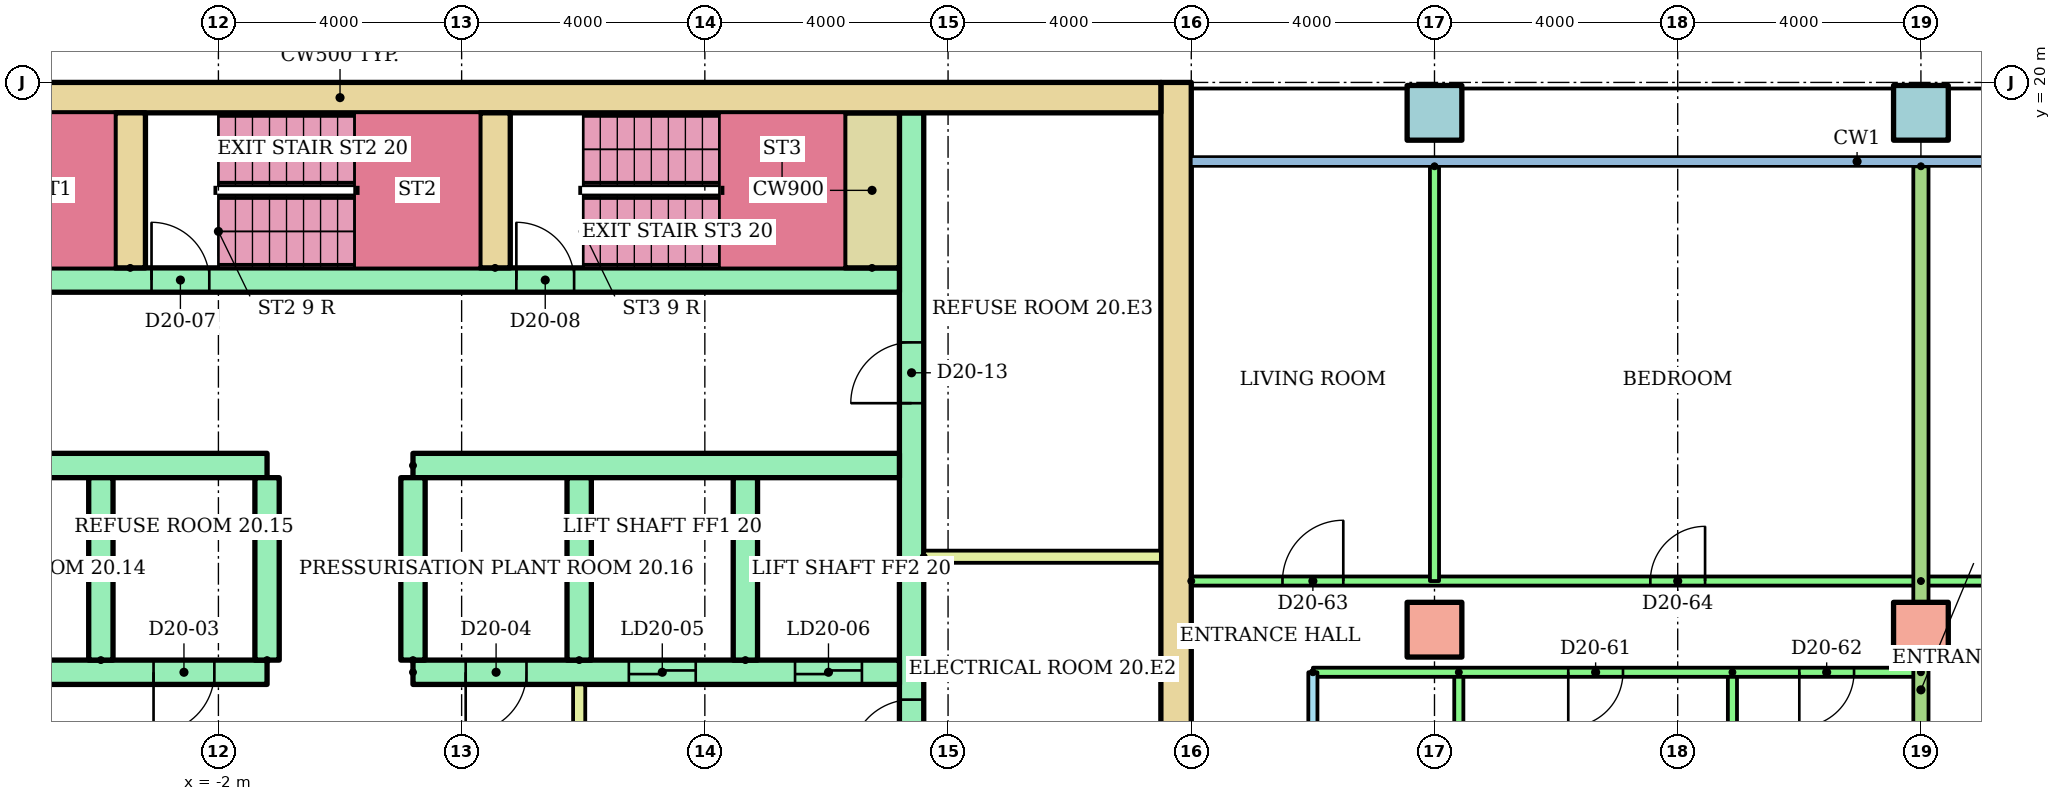
"""IFC4 building model, lengths in metres.
Left out: names, types, materials, properties, quantities, classifications, styles, units other than length and angle.
Written with IfcOpenShell. Run it as: python <this file> out.ifc"""

import sys

from ifc_helpers import new_model, si_unit, direction, frame, frame_2d, origin, origin_2d, place, context, subcontext, project, spatial, rectangle, hollow_rectangle, extrude, element, fill, save


model = new_model("IFC4")
c1 = context("Model", 3, precision=1e-05, world=origin(), true_north=direction((0.0, 1.0)))
c2 = subcontext(c1, "Body", "Model", "MODEL_VIEW")
j1 = project(units=[si_unit("LENGTHUNIT", "METRE"), si_unit("PLANEANGLEUNIT", "RADIAN")], contexts=[c1])
p1 = place(None, origin())
s1 = spatial("IfcSite", under=j1, at=p1, CompositionType="ELEMENT")
p2 = place(p1, origin())
s2 = spatial("IfcBuilding", under=s1, at=p2, CompositionType="ELEMENT")
p3 = place(p2, frame((0.0, 0.0, 80.7)))
s3 = spatial("IfcBuildingStorey", under=s2, at=p3, CompositionType="ELEMENT", Elevation=80.7)
for number, where in (
    (1, (18.0, 11.0, 0.0)),
    (2, (26.0, 11.0, 0.0)),
):
    element("IfcColumn", number, at=place(p3, frame(where)), inside=s3, PredefinedType="COLUMN", context=c2, shape_type="SweptSolid", body=[
        extrude(rectangle(XDim=0.9, YDim=0.9, at=origin_2d()), origin(), (0.0, 0.0, 1.0), 3.2),
    ])
for number, where in (
    (3, (18.0, 19.5, 0.0)),
    (4, (26.0, 19.5, 0.0)),
):
    element("IfcColumn", number, at=place(p3, frame(where)), inside=s3, PredefinedType="COLUMN", context=c2, shape_type="SweptSolid", body=[
        extrude(hollow_rectangle(XDim=0.9, YDim=0.9, WallThickness=0.045, at=origin_2d()), origin(), (0.0, 0.0, 1.0), 3.2),
    ])
p4 = place(p3, frame((13.75, 3.0, 0.0), z_axis=(0.0, 0.0, 1.0), x_axis=(0.0, 1.0, 0.0)))
e5 = element("IfcWall", 5, at=p4, inside=s3, PredefinedType="SHEAR", context=c2, shape_type="SweptSolid", body=[
    extrude(rectangle(XDim=17.0, YDim=0.5, at=frame_2d((8.5, 0.0))), origin(), (0.0, 0.0, 1.0), 2.92),
])
p5 = place(p3, frame((-13.5, 19.75, 0.0)))
e6 = element("IfcWall", 6, at=p5, inside=s3, PredefinedType="SHEAR", context=c2, shape_type="SweptSolid", body=[
    extrude(rectangle(XDim=27.0, YDim=0.5, at=frame_2d((13.5, 0.0))), origin(), (0.0, 0.0, 1.0), 2.92),
])
p6 = place(p3, frame((9.4, 6.8, 0.0), z_axis=(0.0, 0.0, 1.0), x_axis=(0.0, 1.0, 0.0)))
e7 = element("IfcWall", 7, at=p6, inside=s3, PredefinedType="SHEAR", context=c2, shape_type="SweptSolid", body=[
    extrude(rectangle(XDim=12.7, YDim=0.4, at=frame_2d((6.35, 0.0))), origin(), (0.0, 0.0, 1.0), 2.92),
])
p7 = place(p6, frame((0.3, 0.0, 0.0)))
e8 = element("IfcOpeningElement", 8, at=p7, cuts=e7, PredefinedType="OPENING", context=c2, shape_type="SweptSolid", body=[
    extrude(rectangle(XDim=1.0, YDim=2.1, at=frame_2d((0.5, 1.05))), frame((0.0, 0.21, 0.0), z_axis=(0.0, -1.0, 0.0), x_axis=(1.0, 0.0, 0.0)), (0.0, 0.0, 1.0), 0.42),
])
p8 = place(p6, frame((2.05, 0.0, 0.0)))
e9 = element("IfcOpeningElement", 9, at=p8, cuts=e7, PredefinedType="OPENING", context=c2, shape_type="SweptSolid", body=[
    extrude(rectangle(XDim=1.0, YDim=2.1, at=frame_2d((0.5, 1.05))), frame((0.0, 0.21, 0.0), z_axis=(0.0, -1.0, 0.0), x_axis=(1.0, 0.0, 0.0)), (0.0, 0.0, 1.0), 0.42),
])
p9 = place(p6, frame((7.925, 0.0, 0.0)))
e10 = element("IfcOpeningElement", 10, at=p9, cuts=e7, PredefinedType="OPENING", context=c2, shape_type="SweptSolid", body=[
    extrude(rectangle(XDim=1.0, YDim=2.1, at=frame_2d((0.5, 1.05))), frame((0.0, 0.21, 0.0), z_axis=(0.0, -1.0, 0.0), x_axis=(1.0, 0.0, 0.0)), (0.0, 0.0, 1.0), 0.42),
])
p10 = place(p3, frame((-9.2, 10.3, 0.0)))
e11 = element("IfcWall", 11, at=p10, inside=s3, PredefinedType="SHEAR", context=c2, shape_type="SweptSolid", body=[
    extrude(rectangle(XDim=8.0, YDim=0.4, at=frame_2d((4.0, 0.0))), origin(), (0.0, 0.0, 1.0), 2.92),
])
p11 = place(p10, frame((2.033, 0.0, 0.0)))
e12 = element("IfcOpeningElement", 12, at=p11, cuts=e11, PredefinedType="OPENING", context=c2, shape_type="SweptSolid", body=[
    extrude(rectangle(XDim=1.0, YDim=2.1, at=frame_2d((0.5, 1.05))), frame((0.0, 0.21, 0.0), z_axis=(0.0, -1.0, 0.0), x_axis=(1.0, 0.0, 0.0)), (0.0, 0.0, 1.0), 0.42),
])
p12 = place(p10, frame((6.133, 0.0, 0.0)))
e13 = element("IfcOpeningElement", 13, at=p12, cuts=e11, PredefinedType="OPENING", context=c2, shape_type="SweptSolid", body=[
    extrude(rectangle(XDim=1.0, YDim=2.1, at=frame_2d((0.5, 1.05))), frame((0.0, 0.21, 0.0), z_axis=(0.0, -1.0, 0.0), x_axis=(1.0, 0.0, 0.0)), (0.0, 0.0, 1.0), 0.42),
])
p13 = place(p3, frame((-9.2, 13.7, 0.0)))
e14 = element("IfcWall", 14, at=p13, inside=s3, PredefinedType="SHEAR", context=c2, shape_type="SweptSolid", body=[
    extrude(rectangle(XDim=8.0, YDim=0.4, at=frame_2d((4.0, 0.0))), origin(), (0.0, 0.0, 1.0), 2.92),
])
p14 = place(p3, frame((1.2, 10.3, 0.0)))
e15 = element("IfcWall", 15, at=p14, inside=s3, PredefinedType="SHEAR", context=c2, shape_type="SweptSolid", body=[
    extrude(rectangle(XDim=8.0, YDim=0.4, at=frame_2d((4.0, 0.0))), origin(), (0.0, 0.0, 1.0), 2.92),
])
p15 = place(p14, frame((3.55, 0.0, 0.0)))
e16 = element("IfcOpeningElement", 16, at=p15, cuts=e15, PredefinedType="OPENING", context=c2, shape_type="SweptSolid", body=[
    extrude(rectangle(XDim=1.1, YDim=2.1, at=frame_2d((0.55, 1.05))), frame((0.0, 0.21, 0.0), z_axis=(0.0, -1.0, 0.0), x_axis=(1.0, 0.0, 0.0)), (0.0, 0.0, 1.0), 0.42),
])
p16 = place(p14, frame((6.283, 0.0, 0.0)))
e17 = element("IfcOpeningElement", 17, at=p16, cuts=e15, PredefinedType="OPENING", context=c2, shape_type="SweptSolid", body=[
    extrude(rectangle(XDim=1.1, YDim=2.1, at=frame_2d((0.55, 1.05))), frame((0.0, 0.21, 0.0), z_axis=(0.0, -1.0, 0.0), x_axis=(1.0, 0.0, 0.0)), (0.0, 0.0, 1.0), 0.42),
])
p17 = place(p14, frame((0.867, 0.0, 0.0)))
e18 = element("IfcOpeningElement", 18, at=p17, cuts=e15, PredefinedType="OPENING", context=c2, shape_type="SweptSolid", body=[
    extrude(rectangle(XDim=1.0, YDim=2.1, at=frame_2d((0.5, 1.05))), frame((0.0, 0.21, 0.0), z_axis=(0.0, -1.0, 0.0), x_axis=(1.0, 0.0, 0.0)), (0.0, 0.0, 1.0), 0.42),
])
p18 = place(p3, frame((1.2, 13.7, 0.0)))
e19 = element("IfcWall", 19, at=p18, inside=s3, PredefinedType="SHEAR", context=c2, shape_type="SweptSolid", body=[
    extrude(rectangle(XDim=8.0, YDim=0.4, at=frame_2d((4.0, 0.0))), origin(), (0.0, 0.0, 1.0), 2.92),
])
for number, where, z_axis, x_axis in (
    (20, (-3.933, 10.5, 0.0), (0.0, 0.0, 1.0), (0.0, 1.0, 0.0)),
    (21, (-1.2, 10.5, 0.0), (0.0, 0.0, 1.0), (0.0, 1.0, 0.0)),
    (22, (1.2, 10.5, 0.0), (0.0, 0.0, 1.0), (0.0, 1.0, 0.0)),
    (23, (3.933, 10.5, 0.0), (0.0, 0.0, 1.0), (0.0, 1.0, 0.0)),
    (24, (6.667, 10.5, 0.0), (0.0, 0.0, 1.0), (0.0, 1.0, 0.0)),
):
    element("IfcWall", number, at=place(p3, frame(where, z_axis=z_axis, x_axis=x_axis)), inside=s3, PredefinedType="SHEAR", context=c2, shape_type="SweptSolid", body=[
        extrude(rectangle(XDim=3.0, YDim=0.4, at=frame_2d((1.5, 0.0))), origin(), (0.0, 0.0, 1.0), 2.92),
    ])
p19 = place(p3, frame((3.933, 6.8, 0.0), z_axis=(0.0, 0.0, 1.0), x_axis=(0.0, 1.0, 0.0)))
e25 = element("IfcWall", 25, at=p19, inside=s3, PredefinedType="PARTITIONING", context=c2, shape_type="SweptSolid", body=[
    extrude(rectangle(XDim=3.3, YDim=0.2, at=frame_2d((1.65, 0.0))), origin(), (0.0, 0.0, 1.0), 2.92),
])
p20 = place(p19, frame((1.1, 0.0, 0.0)))
e26 = element("IfcOpeningElement", 26, at=p20, cuts=e25, PredefinedType="OPENING", context=c2, shape_type="SweptSolid", body=[
    extrude(rectangle(XDim=1.1, YDim=2.1, at=frame_2d((0.55, 1.05))), frame((0.0, 0.11, 0.0), z_axis=(0.0, -1.0, 0.0), x_axis=(1.0, 0.0, 0.0)), (0.0, 0.0, 1.0), 0.22),
])
p21 = place(p3, frame((-9.2, 16.75, 0.0)))
e27 = element("IfcWall", 27, at=p21, inside=s3, PredefinedType="SHEAR", context=c2, shape_type="SweptSolid", body=[
    extrude(rectangle(XDim=18.4, YDim=0.4, at=frame_2d((9.2, 0.0))), origin(), (0.0, 0.0, 1.0), 2.92),
])
p22 = place(p21, frame((0.1, 0.0, 0.0)))
e28 = element("IfcOpeningElement", 28, at=p22, cuts=e27, PredefinedType="OPENING", context=c2, shape_type="SweptSolid", body=[
    extrude(rectangle(XDim=0.95, YDim=2.1, at=frame_2d((0.475, 1.05))), frame((0.0, 0.21, 0.0), z_axis=(0.0, -1.0, 0.0), x_axis=(1.0, 0.0, 0.0)), (0.0, 0.0, 1.0), 0.42),
])
p23 = place(p21, frame((6.1, 0.0, 0.0)))
e29 = element("IfcOpeningElement", 29, at=p23, cuts=e27, PredefinedType="OPENING", context=c2, shape_type="SweptSolid", body=[
    extrude(rectangle(XDim=0.95, YDim=2.1, at=frame_2d((0.475, 1.05))), frame((0.0, 0.21, 0.0), z_axis=(0.0, -1.0, 0.0), x_axis=(1.0, 0.0, 0.0)), (0.0, 0.0, 1.0), 0.42),
])
p24 = place(p21, frame((12.1, 0.0, 0.0)))
e30 = element("IfcOpeningElement", 30, at=p24, cuts=e27, PredefinedType="OPENING", context=c2, shape_type="SweptSolid", body=[
    extrude(rectangle(XDim=0.95, YDim=2.1, at=frame_2d((0.475, 1.05))), frame((0.0, 0.21, 0.0), z_axis=(0.0, -1.0, 0.0), x_axis=(1.0, 0.0, 0.0)), (0.0, 0.0, 1.0), 0.42),
])
for number, where, z_axis, x_axis in (
    (31, (-3.45, 16.95, 0.0), (0.0, 0.0, 1.0), (0.0, 1.0, 0.0)),
    (32, (2.55, 16.95, 0.0), (0.0, 0.0, 1.0), (0.0, 1.0, 0.0)),
):
    element("IfcWall", number, at=place(p3, frame(where, z_axis=z_axis, x_axis=x_axis)), inside=s3, PredefinedType="SHEAR", context=c2, shape_type="SweptSolid", body=[
        extrude(rectangle(XDim=2.55, YDim=0.5, at=frame_2d((1.275, 0.0))), origin(), (0.0, 0.0, 1.0), 2.92),
    ])
p25 = place(p3, frame((8.75, 16.95, 0.0), z_axis=(0.0, 0.0, 1.0), x_axis=(0.0, 1.0, 0.0)))
e33 = element("IfcWall", 33, at=p25, inside=s3, PredefinedType="SHEAR", context=c2, shape_type="SweptSolid", body=[
    extrude(rectangle(XDim=2.55, YDim=0.9, at=frame_2d((1.275, 0.0))), origin(), (0.0, 0.0, 1.0), 2.92),
])
p26 = place(p3, frame((9.6, 12.2, 0.0)))
e34 = element("IfcWall", 34, at=p26, inside=s3, PredefinedType="PARTITIONING", context=c2, shape_type="SweptSolid", body=[
    extrude(rectangle(XDim=3.9, YDim=0.2, at=frame_2d((1.95, 0.0))), origin(), (0.0, 0.0, 1.0), 2.92),
])
p27 = place(p3, frame((16.0, 10.3, 0.0), z_axis=(0.0, 0.0, 1.0), x_axis=(0.0, -1.0, 0.0)))
e35 = element("IfcWall", 35, at=p27, inside=s3, PredefinedType="PARTITIONING", context=c2, shape_type="SweptSolid", body=[
    extrude(rectangle(XDim=8.9, YDim=0.15, at=frame_2d((4.45, 0.0))), origin(), (0.0, 0.0, 1.0), 2.4),
])
p28 = place(p27, frame((5.95, 0.0, 0.0)))
e36 = element("IfcOpeningElement", 36, at=p28, cuts=e35, PredefinedType="OPENING", context=c2, shape_type="SweptSolid", body=[
    extrude(rectangle(XDim=0.9, YDim=2.1, at=frame_2d((0.45, 1.05))), frame((0.0, 0.085, 0.0), z_axis=(0.0, -1.0, 0.0), x_axis=(1.0, 0.0, 0.0)), (0.0, 0.0, 1.0), 0.17),
])
p29 = place(p27, frame((1.55, 0.0, 0.0)))
e37 = element("IfcOpeningElement", 37, at=p29, cuts=e35, PredefinedType="OPENING", context=c2, shape_type="SweptSolid", body=[
    extrude(rectangle(XDim=0.8, YDim=2.1, at=frame_2d((0.4, 1.05))), frame((0.0, 0.085, 0.0), z_axis=(0.0, -1.0, 0.0), x_axis=(1.0, 0.0, 0.0)), (0.0, 0.0, 1.0), 0.17),
])
for number, where, z_axis, x_axis in (
    (38, (18.4, 10.3, 0.0), (0.0, 0.0, 1.0), (0.0, -1.0, 0.0)),
    (39, (22.9, 10.3, 0.0), (0.0, 0.0, 1.0), (0.0, -1.0, 0.0)),
):
    element("IfcWall", number, at=place(p3, frame(where, z_axis=z_axis, x_axis=x_axis)), inside=s3, PredefinedType="PARTITIONING", context=c2, shape_type="SweptSolid", body=[
        extrude(rectangle(XDim=8.9, YDim=0.15, at=frame_2d((4.45, 0.0))), origin(), (0.0, 0.0, 1.0), 2.4),
    ])
p30 = place(p3, frame((26.0, 10.3, 0.0), z_axis=(0.0, 0.0, 1.0), x_axis=(-1.0, 0.0, 0.0)))
e40 = element("IfcWall", 40, at=p30, inside=s3, PredefinedType="PARTITIONING", context=c2, shape_type="SweptSolid", body=[
    extrude(rectangle(XDim=10.0, YDim=0.15, at=frame_2d((5.0, 0.0))), origin(), (0.0, 0.0, 1.0), 2.4),
])
p31 = place(p30, frame((4.9, 0.0, 0.0)))
e41 = element("IfcOpeningElement", 41, at=p31, cuts=e40, PredefinedType="OPENING", context=c2, shape_type="SweptSolid", body=[
    extrude(rectangle(XDim=0.9, YDim=2.1, at=frame_2d((0.45, 1.05))), frame((0.0, 0.085, 0.0), z_axis=(0.0, -1.0, 0.0), x_axis=(1.0, 0.0, 0.0)), (0.0, 0.0, 1.0), 0.17),
])
p32 = place(p30, frame((1.1, 0.0, 0.0)))
e42 = element("IfcOpeningElement", 42, at=p32, cuts=e40, PredefinedType="OPENING", context=c2, shape_type="SweptSolid", body=[
    extrude(rectangle(XDim=0.9, YDim=2.1, at=frame_2d((0.45, 1.05))), frame((0.0, 0.085, 0.0), z_axis=(0.0, -1.0, 0.0), x_axis=(1.0, 0.0, 0.0)), (0.0, 0.0, 1.0), 0.17),
])
p33 = place(p3, frame((14.0, 11.8, 0.0)))
e43 = element("IfcWall", 43, at=p33, inside=s3, PredefinedType="PARTITIONING", context=c2, shape_type="SweptSolid", body=[
    extrude(rectangle(XDim=12.0, YDim=0.15, at=frame_2d((6.0, 0.0))), origin(), (0.0, 0.0, 1.0), 2.4),
])
p34 = place(p33, frame((1.5, 0.0, 0.0)))
e44 = element("IfcOpeningElement", 44, at=p34, cuts=e43, PredefinedType="OPENING", context=c2, shape_type="SweptSolid", body=[
    extrude(rectangle(XDim=1.0, YDim=2.1, at=frame_2d((0.5, 1.05))), frame((0.0, 0.085, 0.0), z_axis=(0.0, -1.0, 0.0), x_axis=(1.0, 0.0, 0.0)), (0.0, 0.0, 1.0), 0.17),
])
p35 = place(p33, frame((7.55, 0.0, 0.0)))
e45 = element("IfcOpeningElement", 45, at=p35, cuts=e43, PredefinedType="OPENING", context=c2, shape_type="SweptSolid", body=[
    extrude(rectangle(XDim=0.9, YDim=2.1, at=frame_2d((0.45, 1.05))), frame((0.0, 0.085, 0.0), z_axis=(0.0, -1.0, 0.0), x_axis=(1.0, 0.0, 0.0)), (0.0, 0.0, 1.0), 0.17),
])
p36 = place(p3, frame((18.0, 18.621, 0.0), z_axis=(0.0, 0.0, 1.0), x_axis=(0.0, -1.0, 0.0)))
e46 = element("IfcWall", 46, at=p36, inside=s3, PredefinedType="PARTITIONING", context=c2, shape_type="SweptSolid", body=[
    extrude(rectangle(XDim=6.821, YDim=0.15, at=frame_2d((3.411, 0.0))), origin(), (0.0, 0.0, 1.0), 2.4),
])
p37 = place(p3, frame((26.0, 11.8, 0.0)))
e47 = element("IfcWall", 47, at=p37, inside=s3, PredefinedType="PARTITIONING", context=c2, shape_type="SweptSolid", body=[
    extrude(rectangle(XDim=14.62, YDim=0.15, at=frame_2d((7.31, 0.0))), origin(), (0.0, 0.0, 1.0), 2.4),
])
p38 = place(p37, frame((3.5, 0.0, 0.0)))
e48 = element("IfcOpeningElement", 48, at=p38, cuts=e47, PredefinedType="OPENING", context=c2, shape_type="SweptSolid", body=[
    extrude(rectangle(XDim=1.0, YDim=2.1, at=frame_2d((0.5, 1.05))), frame((0.0, 0.085, 0.0), z_axis=(0.0, -1.0, 0.0), x_axis=(1.0, 0.0, 0.0)), (0.0, 0.0, 1.0), 0.17),
])
p39 = place(p37, frame((10.7, 0.0, 0.0)))
e49 = element("IfcOpeningElement", 49, at=p39, cuts=e47, PredefinedType="OPENING", context=c2, shape_type="SweptSolid", body=[
    extrude(rectangle(XDim=1.0, YDim=2.1, at=frame_2d((0.5, 1.05))), frame((0.0, 0.085, 0.0), z_axis=(0.0, -1.0, 0.0), x_axis=(1.0, 0.0, 0.0)), (0.0, 0.0, 1.0), 0.17),
])
p40 = place(p3, frame((26.0, 18.621, 0.0), z_axis=(0.0, 0.0, 1.0), x_axis=(0.0, -1.0, 0.0)))
e50 = element("IfcWall", 50, at=p40, inside=s3, PredefinedType="PARTITIONING", context=c2, shape_type="SweptSolid", body=[
    extrude(rectangle(XDim=17.221, YDim=0.25, at=frame_2d((8.611, 0.0))), origin(), (0.0, 0.0, 1.0), 2.4),
])
p41 = place(p15, origin())
e51 = element("IfcDoor", 51, at=p41, inside=s3, OperationType="SLIDING_TO_LEFT", PredefinedType="DOOR", context=c2, shape_type="SweptSolid", body=[
    extrude(rectangle(XDim=1.1, YDim=2.1, at=frame_2d((0.55, 1.05))), frame((0.0, 0.025, 0.0), z_axis=(0.0, -1.0, 0.0), x_axis=(1.0, 0.0, 0.0)), (0.0, 0.0, 1.0), 0.05),
])
fill(e16, e51)
p42 = place(p16, origin())
e52 = element("IfcDoor", 52, at=p42, inside=s3, OperationType="SLIDING_TO_LEFT", PredefinedType="DOOR", context=c2, shape_type="SweptSolid", body=[
    extrude(rectangle(XDim=1.1, YDim=2.1, at=frame_2d((0.55, 1.05))), frame((0.0, 0.025, 0.0), z_axis=(0.0, -1.0, 0.0), x_axis=(1.0, 0.0, 0.0)), (0.0, 0.0, 1.0), 0.05),
])
fill(e17, e52)
p43 = place(p12, frame((1.0, 0.0, 0.0), z_axis=(0.0, 0.0, 1.0), x_axis=(-1.0, 0.0, 0.0)))
e53 = element("IfcDoor", 53, at=p43, inside=s3, OperationType="SINGLE_SWING_LEFT", PredefinedType="DOOR", context=c2, shape_type="SweptSolid", body=[
    extrude(rectangle(XDim=1.0, YDim=2.1, at=frame_2d((0.5, 1.05))), frame((0.0, 0.025, 0.0), z_axis=(0.0, -1.0, 0.0), x_axis=(1.0, 0.0, 0.0)), (0.0, 0.0, 1.0), 0.05),
])
fill(e13, e53)
p44 = place(p17, frame((1.0, 0.0, 0.0), z_axis=(0.0, 0.0, 1.0), x_axis=(-1.0, 0.0, 0.0)))
e54 = element("IfcDoor", 54, at=p44, inside=s3, OperationType="SINGLE_SWING_LEFT", PredefinedType="DOOR", context=c2, shape_type="SweptSolid", body=[
    extrude(rectangle(XDim=1.0, YDim=2.1, at=frame_2d((0.5, 1.05))), frame((0.0, 0.025, 0.0), z_axis=(0.0, -1.0, 0.0), x_axis=(1.0, 0.0, 0.0)), (0.0, 0.0, 1.0), 0.05),
])
fill(e18, e54)
p45 = place(p23, origin())
e55 = element("IfcDoor", 55, at=p45, inside=s3, OperationType="SINGLE_SWING_LEFT", PredefinedType="DOOR", context=c2, shape_type="SweptSolid", body=[
    extrude(rectangle(XDim=0.95, YDim=2.1, at=frame_2d((0.475, 1.05))), frame((0.0, 0.025, 0.0), z_axis=(0.0, -1.0, 0.0), x_axis=(1.0, 0.0, 0.0)), (0.0, 0.0, 1.0), 0.05),
])
fill(e29, e55)
p46 = place(p24, origin())
e56 = element("IfcDoor", 56, at=p46, inside=s3, OperationType="SINGLE_SWING_LEFT", PredefinedType="DOOR", context=c2, shape_type="SweptSolid", body=[
    extrude(rectangle(XDim=0.95, YDim=2.1, at=frame_2d((0.475, 1.05))), frame((0.0, 0.025, 0.0), z_axis=(0.0, -1.0, 0.0), x_axis=(1.0, 0.0, 0.0)), (0.0, 0.0, 1.0), 0.05),
])
fill(e30, e56)
p47 = place(p8, origin())
e57 = element("IfcDoor", 57, at=p47, inside=s3, OperationType="SINGLE_SWING_LEFT", PredefinedType="DOOR", context=c2, shape_type="SweptSolid", body=[
    extrude(rectangle(XDim=1.0, YDim=2.1, at=frame_2d((0.5, 1.05))), frame((0.0, 0.025, 0.0), z_axis=(0.0, -1.0, 0.0), x_axis=(1.0, 0.0, 0.0)), (0.0, 0.0, 1.0), 0.05),
])
fill(e9, e57)
p48 = place(p9, origin())
e58 = element("IfcDoor", 58, at=p48, inside=s3, OperationType="SINGLE_SWING_LEFT", PredefinedType="DOOR", context=c2, shape_type="SweptSolid", body=[
    extrude(rectangle(XDim=1.0, YDim=2.1, at=frame_2d((0.5, 1.05))), frame((0.0, 0.025, 0.0), z_axis=(0.0, -1.0, 0.0), x_axis=(1.0, 0.0, 0.0)), (0.0, 0.0, 1.0), 0.05),
])
fill(e10, e58)
p49 = place(p31, origin())
e59 = element("IfcDoor", 59, at=p49, inside=s3, OperationType="SINGLE_SWING_RIGHT", PredefinedType="DOOR", context=c2, shape_type="SweptSolid", body=[
    extrude(rectangle(XDim=0.9, YDim=2.1, at=frame_2d((0.45, 1.05))), frame((0.0, 0.025, 0.0), z_axis=(0.0, -1.0, 0.0), x_axis=(1.0, 0.0, 0.0)), (0.0, 0.0, 1.0), 0.05),
])
fill(e41, e59)
p50 = place(p32, origin())
e60 = element("IfcDoor", 60, at=p50, inside=s3, OperationType="SINGLE_SWING_RIGHT", PredefinedType="DOOR", context=c2, shape_type="SweptSolid", body=[
    extrude(rectangle(XDim=0.9, YDim=2.1, at=frame_2d((0.45, 1.05))), frame((0.0, 0.025, 0.0), z_axis=(0.0, -1.0, 0.0), x_axis=(1.0, 0.0, 0.0)), (0.0, 0.0, 1.0), 0.05),
])
fill(e42, e60)
p51 = place(p34, origin())
e61 = element("IfcDoor", 61, at=p51, inside=s3, OperationType="SINGLE_SWING_RIGHT", PredefinedType="DOOR", context=c2, shape_type="SweptSolid", body=[
    extrude(rectangle(XDim=1.0, YDim=2.1, at=frame_2d((0.5, 1.05))), frame((0.0, 0.025, 0.0), z_axis=(0.0, -1.0, 0.0), x_axis=(1.0, 0.0, 0.0)), (0.0, 0.0, 1.0), 0.05),
])
fill(e44, e61)
p52 = place(p35, origin())
e62 = element("IfcDoor", 62, at=p52, inside=s3, OperationType="SINGLE_SWING_RIGHT", PredefinedType="DOOR", context=c2, shape_type="SweptSolid", body=[
    extrude(rectangle(XDim=0.9, YDim=2.1, at=frame_2d((0.45, 1.05))), frame((0.0, 0.025, 0.0), z_axis=(0.0, -1.0, 0.0), x_axis=(1.0, 0.0, 0.0)), (0.0, 0.0, 1.0), 0.05),
])
fill(e45, e62)
save(model, sys.argv[1])
